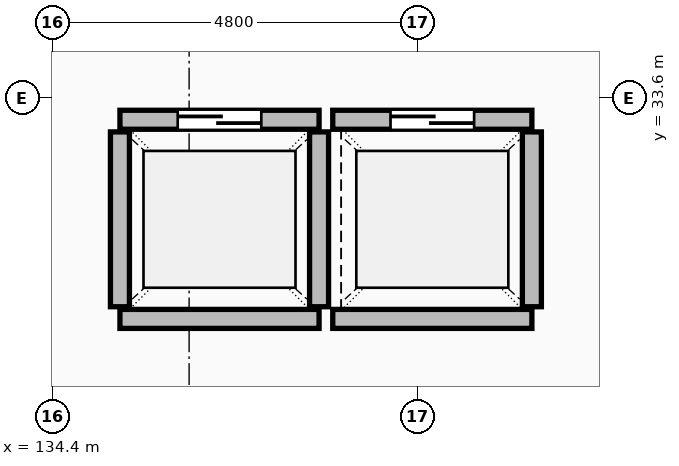
"""IFC4 building model, lengths in metres.
Left out: names, types, materials, properties, quantities, classifications, styles, units other than length and angle.
Written with IfcOpenShell. Run it as: python <this file> out.ifc"""

import sys

from ifc_helpers import new_model, si_unit, direction, frame, frame_2d, origin, place, context, subcontext, project, spatial, rectangle, extrude, element, fill, save


model = new_model("IFC4")
c1 = context("Model", 3, precision=1e-05, world=origin(), true_north=direction((0.0, 1.0)))
c2 = subcontext(c1, "Body", "Model", "MODEL_VIEW")
j1 = project(units=[si_unit("LENGTHUNIT", "METRE"), si_unit("PLANEANGLEUNIT", "RADIAN")], contexts=[c1])
p1 = place(None, origin())
s1 = spatial("IfcSite", under=j1, at=p1, CompositionType="ELEMENT")
p2 = place(p1, origin())
s2 = spatial("IfcBuilding", under=s1, at=p2, CompositionType="ELEMENT")
p3 = place(p2, frame((0.0, 0.0, -4.2)))
s3 = spatial("IfcBuildingStorey", under=s2, at=p3, CompositionType="ELEMENT", Elevation=-4.2)
p4 = place(p3, frame((135.29, 30.69, 0.0), z_axis=(0.0, 0.0, 1.0), x_axis=(1.0, 0.0, 0.0)))
e1 = element("IfcWall", 1, at=p4, inside=s3, PredefinedType="SOLIDWALL", context=c2, shape_type="SweptSolid", body=[
    extrude(rectangle(XDim=2.62, YDim=0.25, at=frame_2d((1.31, 0.0))), origin(), (0.0, 0.0, 1.0), 3.78),
])
p5 = place(p3, frame((135.29, 33.31, 0.0), z_axis=(0.0, 0.0, 1.0), x_axis=(1.0, 0.0, 0.0)))
e2 = element("IfcWall", 2, at=p5, inside=s3, PredefinedType="SOLIDWALL", context=c2, shape_type="SweptSolid", body=[
    extrude(rectangle(XDim=2.62, YDim=0.25, at=frame_2d((1.31, 0.0))), origin(), (0.0, 0.0, 1.0), 3.78),
])
p6 = place(p5, frame((0.76, 0.0, 0.0)))
e3 = element("IfcOpeningElement", 3, at=p6, cuts=e2, PredefinedType="OPENING", context=c2, shape_type="SweptSolid", body=[
    extrude(rectangle(XDim=1.1, YDim=2.2, at=frame_2d((0.55, 1.1))), frame((0.0, 0.137, 0.0), z_axis=(0.0, -1.0, 0.0), x_axis=(1.0, 0.0, 0.0)), (0.0, 0.0, 1.0), 0.274),
])
for number, where, z_axis, x_axis in (
    (4, (135.29, 30.85, 0.0), (0.0, 0.0, 1.0), (0.0, 1.0, 0.0)),
    (5, (137.91, 30.85, 0.0), (0.0, 0.0, 1.0), (0.0, 1.0, 0.0)),
):
    element("IfcWall", number, at=place(p3, frame(where, z_axis=z_axis, x_axis=x_axis)), inside=s3, PredefinedType="SOLIDWALL", context=c2, shape_type="SweptSolid", body=[
        extrude(rectangle(XDim=2.3, YDim=0.25, at=frame_2d((1.15, 0.0))), origin(), (0.0, 0.0, 1.0), 3.78),
    ])
p7 = place(p3, frame((138.09, 30.69, 0.0), z_axis=(0.0, 0.0, 1.0), x_axis=(1.0, 0.0, 0.0)))
e6 = element("IfcWall", 6, at=p7, inside=s3, PredefinedType="SOLIDWALL", context=c2, shape_type="SweptSolid", body=[
    extrude(rectangle(XDim=2.62, YDim=0.25, at=frame_2d((1.31, 0.0))), origin(), (0.0, 0.0, 1.0), 3.78),
])
p8 = place(p3, frame((138.09, 33.31, 0.0), z_axis=(0.0, 0.0, 1.0), x_axis=(1.0, 0.0, 0.0)))
e7 = element("IfcWall", 7, at=p8, inside=s3, PredefinedType="SOLIDWALL", context=c2, shape_type="SweptSolid", body=[
    extrude(rectangle(XDim=2.62, YDim=0.25, at=frame_2d((1.31, 0.0))), origin(), (0.0, 0.0, 1.0), 3.78),
])
p9 = place(p8, frame((0.76, 0.0, 0.0)))
e8 = element("IfcOpeningElement", 8, at=p9, cuts=e7, PredefinedType="OPENING", context=c2, shape_type="SweptSolid", body=[
    extrude(rectangle(XDim=1.1, YDim=2.2, at=frame_2d((0.55, 1.1))), frame((0.0, 0.137, 0.0), z_axis=(0.0, -1.0, 0.0), x_axis=(1.0, 0.0, 0.0)), (0.0, 0.0, 1.0), 0.274),
])
p10 = place(p3, frame((140.71, 30.85, 0.0), z_axis=(0.0, 0.0, 1.0), x_axis=(0.0, 1.0, 0.0)))
e9 = element("IfcWall", 9, at=p10, inside=s3, PredefinedType="SOLIDWALL", context=c2, shape_type="SweptSolid", body=[
    extrude(rectangle(XDim=2.3, YDim=0.25, at=frame_2d((1.15, 0.0))), origin(), (0.0, 0.0, 1.0), 3.78),
])
p11 = place(p6, origin())
e10 = element("IfcDoor", 10, at=p11, inside=s3, OperationType="SLIDING_TO_LEFT", PredefinedType="DOOR", context=c2, shape_type="SweptSolid", body=[
    extrude(rectangle(XDim=1.1, YDim=2.2, at=frame_2d((0.55, 1.1))), frame((0.0, 0.025, 0.0), z_axis=(0.0, -1.0, 0.0), x_axis=(1.0, 0.0, 0.0)), (0.0, 0.0, 1.0), 0.05),
])
fill(e3, e10)
p12 = place(p9, origin())
e11 = element("IfcDoor", 11, at=p12, inside=s3, OperationType="SLIDING_TO_LEFT", PredefinedType="DOOR", context=c2, shape_type="SweptSolid", body=[
    extrude(rectangle(XDim=1.1, YDim=2.2, at=frame_2d((0.55, 1.1))), frame((0.0, 0.025, 0.0), z_axis=(0.0, -1.0, 0.0), x_axis=(1.0, 0.0, 0.0)), (0.0, 0.0, 1.0), 0.05),
])
fill(e8, e11)
save(model, sys.argv[1])
